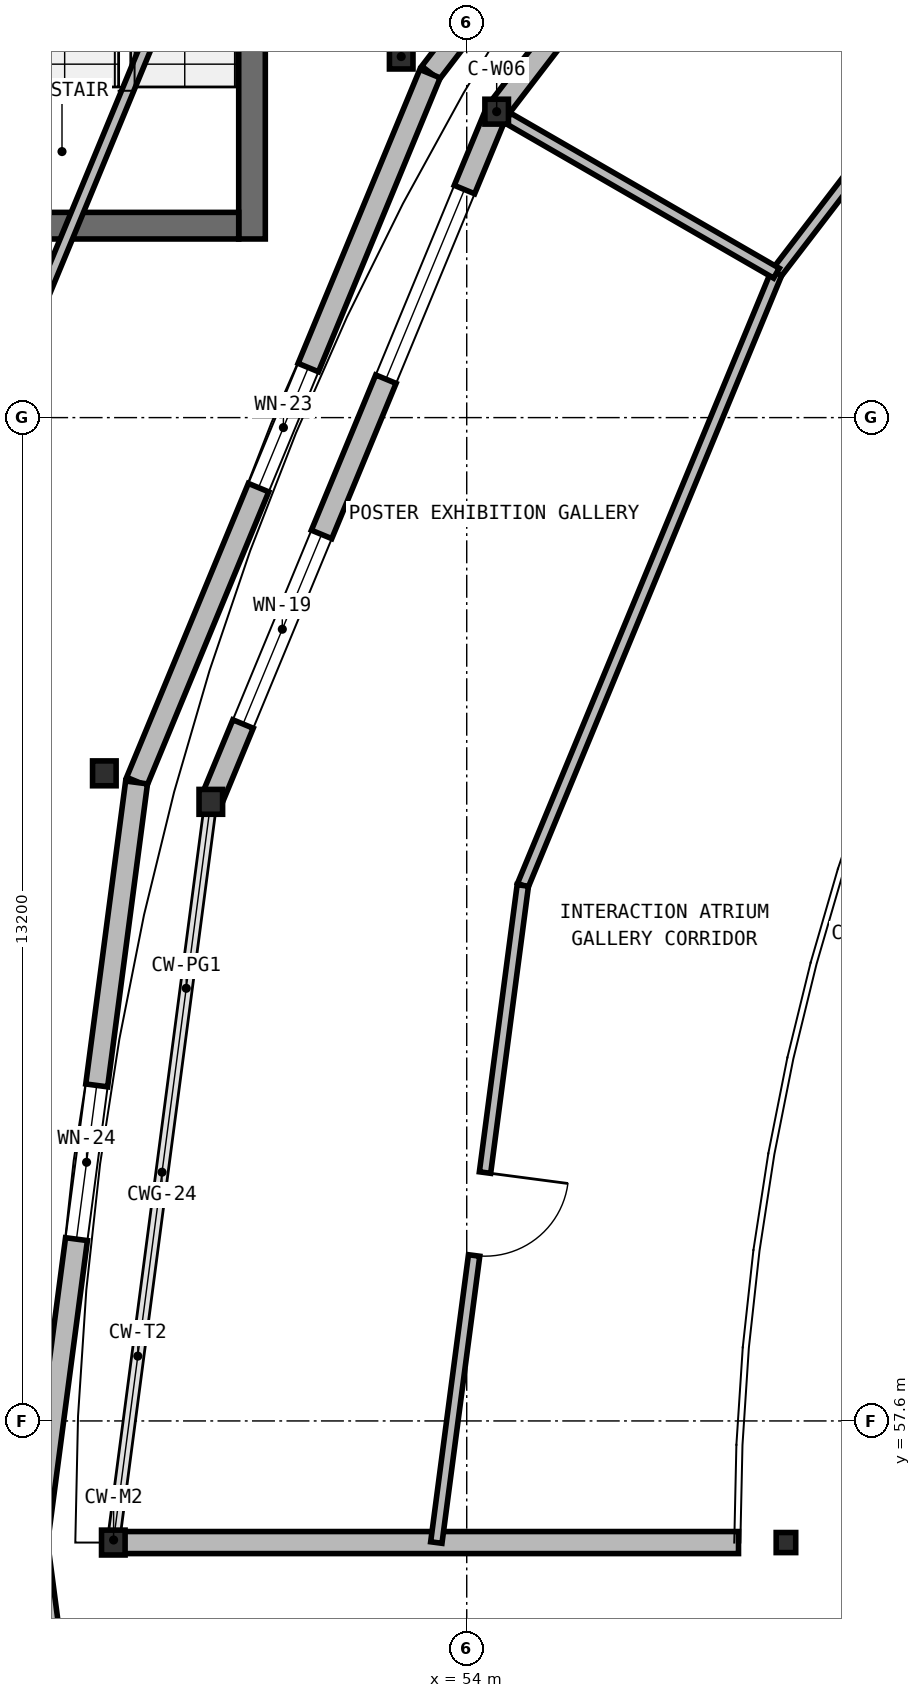
"""IFC4 building model, lengths in metres.
Left out: names, types, materials, properties, quantities, classifications, styles, units other than length and angle.
Written with IfcOpenShell. Run it as: python <this file> out.ifc"""

import sys

from ifc_helpers import new_model, si_unit, direction, frame, frame_2d, origin, origin_2d, place, context, subcontext, project, spatial, rectangle, i_section, extrude, element, fill, save


model = new_model("IFC4")
c1 = context("Model", 3, precision=1e-05, world=origin(), true_north=direction((0.0, 1.0)))
c2 = subcontext(c1, "Body", "Model", "MODEL_VIEW")
j1 = project(units=[si_unit("LENGTHUNIT", "METRE"), si_unit("PLANEANGLEUNIT", "RADIAN")], contexts=[c1])
p1 = place(None, origin())
s1 = spatial("IfcSite", under=j1, at=p1, CompositionType="ELEMENT")
p2 = place(p1, origin())
s2 = spatial("IfcBuilding", under=s1, at=p2, CompositionType="ELEMENT")
p3 = place(p2, frame((0.0, 0.0, 9.8)))
s3 = spatial("IfcBuildingStorey", under=s2, at=p3, CompositionType="ELEMENT", Elevation=9.8)
p4 = place(p3, frame((51.175, 81.35, 0.0), z_axis=(0.0, 0.0, 1.0), x_axis=(0.0, -1.0, 0.0)))
e1 = element("IfcWall", 1, at=p4, inside=s3, PredefinedType="SHEAR", context=c2, shape_type="SweptSolid", body=[
    extrude(rectangle(XDim=8.2, YDim=0.35, at=frame_2d((4.1, 0.0))), origin(), (0.0, 0.0, 1.0), 4.55),
])
p5 = place(p3, frame((51.0, 73.325, 0.0), z_axis=(0.0, 0.0, 1.0), x_axis=(-1.0, 0.0, 0.0)))
e2 = element("IfcWall", 2, at=p5, inside=s3, PredefinedType="SHEAR", context=c2, shape_type="SweptSolid", body=[
    extrude(rectangle(XDim=3.0, YDim=0.35, at=frame_2d((1.5, 0.0))), origin(), (0.0, 0.0, 1.0), 4.55),
])
for number, where, z_axis, x_axis in (
    (3, (53.138, 75.55, 0.0), (0.0, 0.0, 1.0), (1.0, 0.0, 0.0)),
    (4, (49.232, 66.12, 0.0), (0.0, 0.0, 1.0), (1.0, 0.0, 0.0)),
    (5, (54.394, 74.825, 0.0), (0.0, 0.0, 1.0), (1.0, 0.0, 0.0)),
    (6, (50.633, 65.745, 0.0), (0.0, 0.0, 1.0), (1.0, 0.0, 0.0)),
    (7, (49.35, 56.0, 0.0), (0.0, 0.0, 1.0), (1.0, 0.0, 0.0)),
):
    element("IfcColumn", number, at=place(p3, frame(where, z_axis=z_axis, x_axis=x_axis)), inside=s3, PredefinedType="COLUMN", context=c2, shape_type="SweptSolid", body=[
        extrude(i_section(OverallWidth=0.31, OverallDepth=0.327, WebThickness=0.016, FlangeThickness=0.025, at=origin_2d()), origin(), (0.0, 0.0, 1.0), 4.55),
    ])
p6 = place(p3, frame((58.2, 56.0, 0.0), z_axis=(0.0, 0.0, 1.0), x_axis=(1.0, 0.0, 0.0)))
e8 = element("IfcColumn", 8, at=p6, inside=s3, PredefinedType="COLUMN", context=c2, shape_type="SweptSolid", body=[
    extrude(i_section(OverallWidth=0.257, OverallDepth=0.264, WebThickness=0.012, FlangeThickness=0.02, at=origin_2d()), origin(), (0.0, 0.0, 1.0), 4.55),
])
p7 = place(p3, frame((59.659, 83.332, 0.0), z_axis=(0.0, 0.0, 1.0), x_axis=(-0.608737604027, -0.793371621275, 0.0)))
e9 = element("IfcWall", 9, at=p7, inside=s3, PredefinedType="SOLIDWALL", context=c2, shape_type="SweptSolid", body=[
    extrude(rectangle(XDim=10.08, YDim=0.29, at=frame_2d((5.04, 0.0))), origin(), (0.0, 0.0, 1.0), 3.814),
])
p8 = place(p7, frame((4.35, 0.0, 0.95)))
e10 = element("IfcOpeningElement", 10, at=p8, cuts=e9, PredefinedType="OPENING", context=c2, shape_type="SweptSolid", body=[
    extrude(rectangle(XDim=1.38, YDim=1.67, at=frame_2d((0.69, 0.835))), frame((0.0, 0.155, 0.0), z_axis=(0.0, -1.0, 0.0), x_axis=(1.0, 0.0, 0.0)), (0.0, 0.0, 1.0), 0.31),
])
p9 = place(p3, frame((53.517, 75.325, 0.0), z_axis=(0.0, 0.0, 1.0), x_axis=(-0.382733240508, -0.92385889973, 0.0)))
e11 = element("IfcWall", 11, at=p9, inside=s3, PredefinedType="SOLIDWALL", context=c2, shape_type="SweptSolid", body=[
    extrude(rectangle(XDim=10.081, YDim=0.29, at=frame_2d((5.04, 0.0))), origin(), (0.0, 0.0, 1.0), 4.37),
])
p10 = place(p9, frame((4.185, 0.0, 0.95)))
e12 = element("IfcOpeningElement", 12, at=p10, cuts=e11, PredefinedType="OPENING", context=c2, shape_type="SweptSolid", body=[
    extrude(rectangle(XDim=1.71, YDim=1.59, at=frame_2d((0.855, 0.795))), frame((0.0, 0.155, 0.0), z_axis=(0.0, -1.0, 0.0), x_axis=(1.0, 0.0, 0.0)), (0.0, 0.0, 1.0), 0.31),
])
p11 = place(p3, frame((49.656, 66.0, 0.0), z_axis=(0.0, 0.0, 1.0), x_axis=(-0.130450126879, -0.991454872597, 0.0)))
e13 = element("IfcWall", 13, at=p11, inside=s3, PredefinedType="SOLIDWALL", context=c2, shape_type="SweptSolid", body=[
    extrude(rectangle(XDim=10.08, YDim=0.29, at=frame_2d((5.04, 0.0))), origin(), (0.0, 0.0, 1.0), 3.733),
])
p12 = place(p11, frame((4.02, 0.0, 0.95)))
e14 = element("IfcOpeningElement", 14, at=p12, cuts=e13, PredefinedType="OPENING", context=c2, shape_type="SweptSolid", body=[
    extrude(rectangle(XDim=2.04, YDim=1.51, at=frame_2d((1.02, 0.755))), frame((0.0, 0.155, 0.0), z_axis=(0.0, -1.0, 0.0), x_axis=(1.0, 0.0, 0.0)), (0.0, 0.0, 1.0), 0.31),
])
p13 = place(p3, frame((48.341, 55.994, 0.0), z_axis=(0.0, 0.0, 1.0), x_axis=(0.130450126879, -0.991454872597, 0.0)))
e15 = element("IfcWall", 15, at=p13, inside=s3, PredefinedType="SOLIDWALL", context=c2, shape_type="SweptSolid", body=[
    extrude(rectangle(XDim=10.08, YDim=0.29, at=frame_2d((5.04, 0.0))), origin(), (0.0, 0.0, 1.0), 3.686),
])
p14 = place(p13, frame((3.855, 0.0, 0.95)))
e16 = element("IfcOpeningElement", 16, at=p14, cuts=e15, PredefinedType="OPENING", context=c2, shape_type="SweptSolid", body=[
    extrude(rectangle(XDim=2.37, YDim=1.43, at=frame_2d((1.185, 0.715))), frame((0.0, 0.155, 0.0), z_axis=(0.0, -1.0, 0.0), x_axis=(1.0, 0.0, 0.0)), (0.0, 0.0, 1.0), 0.31),
])
p15 = place(p3, frame((54.397, 74.828, 0.0), z_axis=(0.0, 0.0, 1.0), x_axis=(0.608746738158, 0.793364612762, 0.0)))
e17 = element("IfcWall", 17, at=p15, inside=s3, PredefinedType="SOLIDWALL", context=c2, shape_type="SweptSolid", body=[
    extrude(rectangle(XDim=9.82, YDim=0.29, at=frame_2d((4.91, 0.0))), origin(), (0.0, 0.0, 1.0), 3.811),
])
p16 = place(p15, frame((1.435, 0.0, 0.95)))
e18 = element("IfcOpeningElement", 18, at=p16, cuts=e17, PredefinedType="OPENING", context=c2, shape_type="SweptSolid", body=[
    extrude(rectangle(XDim=2.04, YDim=1.56, at=frame_2d((1.02, 0.78))), frame((0.0, 0.155, 0.0), z_axis=(0.0, -1.0, 0.0), x_axis=(1.0, 0.0, 0.0)), (0.0, 0.0, 1.0), 0.31),
])
p17 = place(p15, frame((6.345, 0.0, 0.95)))
e19 = element("IfcOpeningElement", 19, at=p17, cuts=e17, PredefinedType="OPENING", context=c2, shape_type="SweptSolid", body=[
    extrude(rectangle(XDim=2.04, YDim=1.56, at=frame_2d((1.02, 0.78))), frame((0.0, 0.155, 0.0), z_axis=(0.0, -1.0, 0.0), x_axis=(1.0, 0.0, 0.0)), (0.0, 0.0, 1.0), 0.31),
])
p18 = place(p3, frame((50.634, 65.748, 0.0), z_axis=(0.0, 0.0, 1.0), x_axis=(0.382759423628, 0.923848052238, 0.0)))
e20 = element("IfcWall", 20, at=p18, inside=s3, PredefinedType="SOLIDWALL", context=c2, shape_type="SweptSolid", body=[
    extrude(rectangle(XDim=9.821, YDim=0.29, at=frame_2d((4.91, 0.0))), origin(), (0.0, 0.0, 1.0), 3.811),
])
p19 = place(p18, frame((1.105, 0.0, 0.95)))
e21 = element("IfcOpeningElement", 21, at=p19, cuts=e20, PredefinedType="OPENING", context=c2, shape_type="SweptSolid", body=[
    extrude(rectangle(XDim=2.7, YDim=1.4, at=frame_2d((1.35, 0.7))), frame((0.0, 0.155, 0.0), z_axis=(0.0, -1.0, 0.0), x_axis=(1.0, 0.0, 0.0)), (0.0, 0.0, 1.0), 0.31),
])
p20 = place(p18, frame((6.016, 0.0, 0.95)))
e22 = element("IfcOpeningElement", 22, at=p20, cuts=e20, PredefinedType="OPENING", context=c2, shape_type="SweptSolid", body=[
    extrude(rectangle(XDim=2.7, YDim=1.4, at=frame_2d((1.35, 0.7))), frame((0.0, 0.155, 0.0), z_axis=(0.0, -1.0, 0.0), x_axis=(1.0, 0.0, 0.0)), (0.0, 0.0, 1.0), 0.31),
])
p21 = place(p3, frame((49.374, 56.0, 0.0), z_axis=(0.0, 0.0, 1.0), x_axis=(1.0, 0.0, 0.0)))
e23 = element("IfcWall", 23, at=p21, inside=s3, PredefinedType="SOLIDWALL", context=c2, shape_type="SweptSolid", body=[
    extrude(rectangle(XDim=8.202, YDim=0.29, at=frame_2d((4.101, 0.0))), origin(), (0.0, 0.0, 1.0), 3.893),
])
p22 = place(p3, frame((50.384, 77.14, 0.0), z_axis=(0.0, 0.0, 1.0), x_axis=(-0.382644845446, -0.923895514793, 0.0)))
e24 = element("IfcWall", 24, at=p22, inside=s3, PredefinedType="PARTITIONING", context=c2, shape_type="SweptSolid", body=[
    extrude(rectangle(XDim=11.037, YDim=0.15, at=frame_2d((5.518, 0.0))), origin(), (0.0, 0.0, 1.0), 3.737),
])
p23 = place(p3, frame((63.383, 79.617, 0.0), z_axis=(0.0, 0.0, 1.0), x_axis=(-0.608798294056, -0.793325051384, 0.0)))
e25 = element("IfcWall", 25, at=p23, inside=s3, PredefinedType="PARTITIONING", context=c2, shape_type="SweptSolid", body=[
    extrude(rectangle(XDim=8.719, YDim=0.15, at=frame_2d((4.359, 0.0))), origin(), (0.0, 0.0, 1.0), 3.815),
])
p24 = place(p23, frame((3.81, 0.0, 0.0)))
e26 = element("IfcOpeningElement", 26, at=p24, cuts=e25, PredefinedType="OPENING", context=c2, shape_type="SweptSolid", body=[
    extrude(rectangle(XDim=1.1, YDim=2.2, at=frame_2d((0.55, 1.1))), frame((0.0, 0.085, 0.0), z_axis=(0.0, -1.0, 0.0), x_axis=(1.0, 0.0, 0.0)), (0.0, 0.0, 1.0), 0.17),
])
p25 = place(p3, frame((58.075, 72.7, 0.0), z_axis=(0.0, 0.0, 1.0), x_axis=(-0.382727695016, -0.923861197079, 0.0)))
e27 = element("IfcWall", 27, at=p25, inside=s3, PredefinedType="PARTITIONING", context=c2, shape_type="SweptSolid", body=[
    extrude(rectangle(XDim=8.719, YDim=0.15, at=frame_2d((4.359, 0.0))), origin(), (0.0, 0.0, 1.0), 3.815),
])
p26 = place(p3, frame((54.738, 64.645, 0.0), z_axis=(0.0, 0.0, 1.0), x_axis=(-0.130503763364, -0.991447813931, 0.0)))
e28 = element("IfcWall", 28, at=p26, inside=s3, PredefinedType="PARTITIONING", context=c2, shape_type="SweptSolid", body=[
    extrude(rectangle(XDim=8.719, YDim=0.15, at=frame_2d((4.36, 0.0))), origin(), (0.0, 0.0, 1.0), 4.3),
])
p27 = place(p26, frame((3.81, 0.0, 0.0)))
e29 = element("IfcOpeningElement", 29, at=p27, cuts=e28, PredefinedType="OPENING", context=c2, shape_type="SweptSolid", body=[
    extrude(rectangle(XDim=1.1, YDim=2.2, at=frame_2d((0.55, 1.1))), frame((0.0, 0.085, 0.0), z_axis=(0.0, -1.0, 0.0), x_axis=(1.0, 0.0, 0.0)), (0.0, 0.0, 1.0), 0.17),
])
p28 = place(p3, frame((58.075, 72.7, 0.0), z_axis=(0.0, 0.0, 1.0), x_axis=(-0.866055070284, 0.499948612594, 0.0)))
e30 = element("IfcWall", 30, at=p28, inside=s3, PredefinedType="PARTITIONING", context=c2, shape_type="SweptSolid", body=[
    extrude(rectangle(XDim=4.081, YDim=0.15, at=frame_2d((2.04, 0.0))), origin(), (0.0, 0.0, 1.0), 3.815),
])
p29 = place(p10, origin())
e31 = element("IfcWindow", 31, at=p29, inside=s3, PartitioningType="SINGLE_PANEL", PredefinedType="WINDOW", context=c2, shape_type="SweptSolid", body=[
    extrude(rectangle(XDim=1.71, YDim=1.59, at=frame_2d((0.855, 0.795))), frame((0.0, 0.03, 0.0), z_axis=(0.0, -1.0, 0.0), x_axis=(1.0, 0.0, 0.0)), (0.0, 0.0, 1.0), 0.06),
])
fill(e12, e31)
p30 = place(p12, origin())
e32 = element("IfcWindow", 32, at=p30, inside=s3, PartitioningType="SINGLE_PANEL", PredefinedType="WINDOW", context=c2, shape_type="SweptSolid", body=[
    extrude(rectangle(XDim=2.04, YDim=1.51, at=frame_2d((1.02, 0.755))), frame((0.0, 0.03, 0.0), z_axis=(0.0, -1.0, 0.0), x_axis=(1.0, 0.0, 0.0)), (0.0, 0.0, 1.0), 0.06),
])
fill(e14, e32)
p31 = place(p19, origin())
e33 = element("IfcWindow", 33, at=p31, inside=s3, PartitioningType="SINGLE_PANEL", PredefinedType="WINDOW", context=c2, shape_type="SweptSolid", body=[
    extrude(rectangle(XDim=2.7, YDim=1.4, at=frame_2d((1.35, 0.7))), frame((0.0, 0.03, 0.0), z_axis=(0.0, -1.0, 0.0), x_axis=(1.0, 0.0, 0.0)), (0.0, 0.0, 1.0), 0.06),
])
fill(e21, e33)
p32 = place(p20, origin())
e34 = element("IfcWindow", 34, at=p32, inside=s3, PartitioningType="SINGLE_PANEL", PredefinedType="WINDOW", context=c2, shape_type="SweptSolid", body=[
    extrude(rectangle(XDim=2.7, YDim=1.4, at=frame_2d((1.35, 0.7))), frame((0.0, 0.03, 0.0), z_axis=(0.0, -1.0, 0.0), x_axis=(1.0, 0.0, 0.0)), (0.0, 0.0, 1.0), 0.06),
])
fill(e22, e34)
p33 = place(p27, origin())
e35 = element("IfcDoor", 35, at=p33, inside=s3, OperationType="SINGLE_SWING_LEFT", PredefinedType="DOOR", context=c2, shape_type="SweptSolid", body=[
    extrude(rectangle(XDim=1.1, YDim=2.2, at=frame_2d((0.55, 1.1))), frame((0.0, 0.025, 0.0), z_axis=(0.0, -1.0, 0.0), x_axis=(1.0, 0.0, 0.0)), (0.0, 0.0, 1.0), 0.05),
])
fill(e29, e35)
save(model, sys.argv[1])
